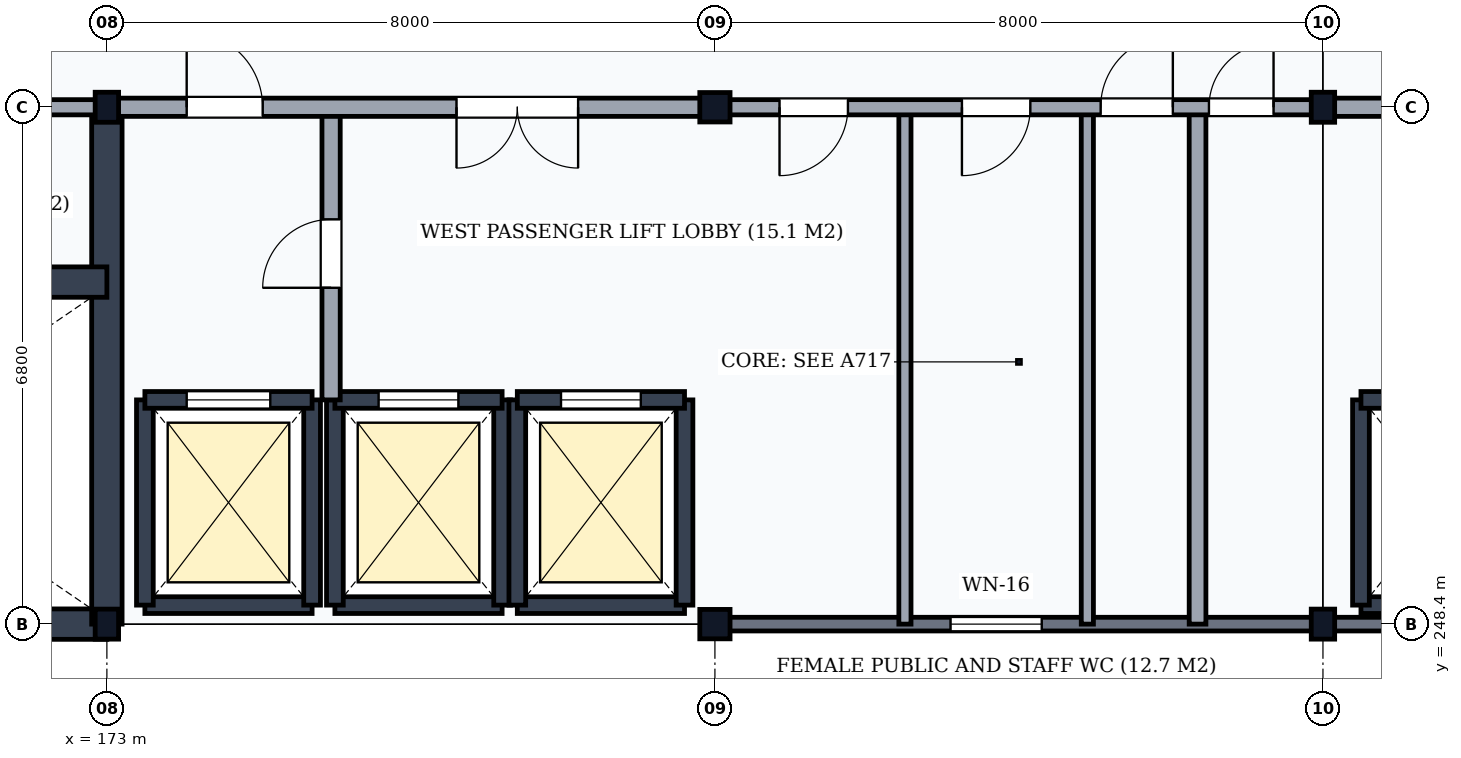
"""IFC4 building model, lengths in metres.
Left out: names, types, materials, properties, quantities, classifications, styles, units other than length and angle.
Written with IfcOpenShell. Run it as: python <this file> out.ifc"""

import sys

from ifc_helpers import new_model, si_unit, direction, frame, frame_2d, origin, origin_2d, place, context, subcontext, project, spatial, rectangle, i_section, extrude, element, fill, save


model = new_model("IFC4")
c1 = context("Model", 3, precision=1e-05, world=origin(), true_north=direction((0.0, 1.0)))
c2 = subcontext(c1, "Body", "Model", "MODEL_VIEW")
j1 = project(units=[si_unit("LENGTHUNIT", "METRE"), si_unit("PLANEANGLEUNIT", "RADIAN")], contexts=[c1])
p1 = place(None, origin())
s1 = spatial("IfcSite", under=j1, at=p1, CompositionType="ELEMENT")
p2 = place(p1, origin())
s2 = spatial("IfcBuilding", under=s1, at=p2, CompositionType="ELEMENT")
p3 = place(p2, frame((0.0, 0.0, 28.2)))
s3 = spatial("IfcBuildingStorey", under=s2, at=p3, CompositionType="ELEMENT", Elevation=28.2)
for number, where, z_axis, x_axis in (
    (1, (173.0, 248.4, 0.0), (0.0, 0.0, 1.0), (1.0, 0.0, 0.0)),
    (2, (173.0, 255.2, 0.0), (0.0, 0.0, 1.0), (1.0, 0.0, 0.0)),
):
    element("IfcColumn", number, at=place(p3, frame(where, z_axis=z_axis, x_axis=x_axis)), inside=s3, PredefinedType="COLUMN", context=c2, shape_type="SweptSolid", body=[
        extrude(i_section(OverallWidth=0.308, OverallDepth=0.395, WebThickness=0.021, FlangeThickness=0.04, FilletRadius=0.027, at=origin_2d()), origin(), (0.0, 0.0, 1.0), 3.9),
    ])
for number, where, z_axis, x_axis in (
    (3, (181.0, 248.4, 0.0), (0.0, 0.0, 1.0), (1.0, 0.0, 0.0)),
    (4, (181.0, 255.2, 0.0), (0.0, 0.0, 1.0), (1.0, 0.0, 0.0)),
):
    element("IfcColumn", number, at=place(p3, frame(where, z_axis=z_axis, x_axis=x_axis)), inside=s3, PredefinedType="COLUMN", context=c2, shape_type="SweptSolid", body=[
        extrude(i_section(OverallWidth=0.398, OverallDepth=0.387, WebThickness=0.021, FlangeThickness=0.033, FilletRadius=0.015, at=origin_2d()), origin(), (0.0, 0.0, 1.0), 3.9),
    ])
for number, where, z_axis, x_axis in (
    (5, (189.0, 248.4, 0.0), (0.0, 0.0, 1.0), (1.0, 0.0, 0.0)),
    (6, (189.0, 255.2, 0.0), (0.0, 0.0, 1.0), (1.0, 0.0, 0.0)),
):
    element("IfcColumn", number, at=place(p3, frame(where, z_axis=z_axis, x_axis=x_axis)), inside=s3, PredefinedType="COLUMN", context=c2, shape_type="SweptSolid", body=[
        extrude(i_section(OverallWidth=0.308, OverallDepth=0.395, WebThickness=0.021, FlangeThickness=0.04, FilletRadius=0.027, at=origin_2d()), origin(), (0.0, 0.0, 1.0), 3.9),
    ])
p4 = place(p3, frame((181.006, 248.4, 0.0), z_axis=(0.0, 0.0, 1.0), x_axis=(1.0, 0.0, 0.0)))
e7 = element("IfcWall", 7, at=p4, inside=s3, PredefinedType="SOLIDWALL", context=c2, shape_type="SweptSolid", body=[
    extrude(rectangle(XDim=7.988, YDim=0.18, at=frame_2d((3.994, 0.0))), origin(), (0.0, 0.0, 1.0), 3.348),
])
p5 = place(p4, frame((3.094, 0.0, 0.95)))
e8 = element("IfcOpeningElement", 8, at=p5, cuts=e7, PredefinedType="OPENING", context=c2, shape_type="SweptSolid", body=[
    extrude(rectangle(XDim=1.2, YDim=1.8, at=frame_2d((0.6, 0.9))), frame((0.0, 0.105, 0.0), z_axis=(0.0, -1.0, 0.0), x_axis=(1.0, 0.0, 0.0)), (0.0, 0.0, 1.0), 0.21),
])
p6 = place(p3, frame((189.006, 248.4, 0.0), z_axis=(0.0, 0.0, 1.0), x_axis=(1.0, 0.0, 0.0)))
e9 = element("IfcWall", 9, at=p6, inside=s3, PredefinedType="SOLIDWALL", context=c2, shape_type="SweptSolid", body=[
    extrude(rectangle(XDim=7.988, YDim=0.18, at=frame_2d((3.994, 0.0))), origin(), (0.0, 0.0, 1.0), 3.348),
])
p7 = place(p3, frame((165.0, 248.4, 0.0), z_axis=(0.0, 0.0, 1.0), x_axis=(1.0, 0.0, 0.0)))
e10 = element("IfcWall", 10, at=p7, inside=s3, PredefinedType="SHEAR", context=c2, shape_type="SweptSolid", body=[
    extrude(rectangle(XDim=8.0, YDim=0.4, at=frame_2d((4.0, 0.0))), origin(), (0.0, 0.0, 1.0), 3.66),
])
p8 = place(p3, frame((173.0, 248.4, 0.0), z_axis=(0.0, 0.0, 1.0), x_axis=(0.0, 1.0, 0.0)))
e11 = element("IfcWall", 11, at=p8, inside=s3, PredefinedType="SHEAR", context=c2, shape_type="SweptSolid", body=[
    extrude(rectangle(XDim=6.8, YDim=0.4, at=frame_2d((3.4, 0.0))), origin(), (0.0, 0.0, 1.0), 3.66),
])
p9 = place(p3, frame((165.0, 252.9, 0.0), z_axis=(0.0, 0.0, 1.0), x_axis=(1.0, 0.0, 0.0)))
e12 = element("IfcWall", 12, at=p9, inside=s3, PredefinedType="SHEAR", context=c2, shape_type="SweptSolid", body=[
    extrude(rectangle(XDim=8.0, YDim=0.4, at=frame_2d((4.0, 0.0))), origin(), (0.0, 0.0, 1.0), 3.66),
])
p10 = place(p9, frame((0.3, 0.0, 0.0)))
e13 = element("IfcOpeningElement", 13, at=p10, cuts=e12, PredefinedType="OPENING", context=c2, shape_type="SweptSolid", body=[
    extrude(rectangle(XDim=1.15, YDim=2.15, at=frame_2d((0.575, 1.075))), frame((0.0, 0.215, 0.0), z_axis=(0.0, -1.0, 0.0), x_axis=(1.0, 0.0, 0.0)), (0.0, 0.0, 1.0), 0.43),
])
p11 = place(p3, frame((165.0, 255.2, 0.0), z_axis=(0.0, 0.0, 1.0), x_axis=(1.0, 0.0, 0.0)))
e14 = element("IfcWall", 14, at=p11, inside=s3, PredefinedType="PARTITIONING", context=c2, shape_type="SweptSolid", body=[
    extrude(rectangle(XDim=8.0, YDim=0.2, at=frame_2d((4.0, 0.0))), origin(), (0.0, 0.0, 1.0), 3.058),
])
p12 = place(p11, frame((3.275, 0.0, 0.0)))
e15 = element("IfcOpeningElement", 15, at=p12, cuts=e14, PredefinedType="OPENING", context=c2, shape_type="SweptSolid", body=[
    extrude(rectangle(XDim=1.45, YDim=2.2, at=frame_2d((0.725, 1.1))), frame((0.0, 0.115, 0.0), z_axis=(0.0, -1.0, 0.0), x_axis=(1.0, 0.0, 0.0)), (0.0, 0.0, 1.0), 0.23),
])
p13 = place(p3, frame((173.5, 248.65, 0.0), z_axis=(0.0, 0.0, 1.0), x_axis=(1.0, 0.0, 0.0)))
e16 = element("IfcWall", 16, at=p13, inside=s3, PredefinedType="SHEAR", context=c2, shape_type="SweptSolid", body=[
    extrude(rectangle(XDim=2.2, YDim=0.22, at=frame_2d((1.1, 0.0))), origin(), (0.0, 0.0, 1.0), 3.66),
])
for number, where, z_axis, x_axis in (
    (17, (173.5, 248.65, 0.0), (0.0, 0.0, 1.0), (0.0, 1.0, 0.0)),
    (18, (175.7, 248.65, 0.0), (0.0, 0.0, 1.0), (0.0, 1.0, 0.0)),
):
    element("IfcWall", number, at=place(p3, frame(where, z_axis=z_axis, x_axis=x_axis)), inside=s3, PredefinedType="SHEAR", context=c2, shape_type="SweptSolid", body=[
        extrude(rectangle(XDim=2.7, YDim=0.22, at=frame_2d((1.35, 0.0))), origin(), (0.0, 0.0, 1.0), 3.66),
    ])
p14 = place(p3, frame((173.5, 251.35, 0.0), z_axis=(0.0, 0.0, 1.0), x_axis=(1.0, 0.0, 0.0)))
e19 = element("IfcWall", 19, at=p14, inside=s3, PredefinedType="SHEAR", context=c2, shape_type="SweptSolid", body=[
    extrude(rectangle(XDim=2.2, YDim=0.22, at=frame_2d((1.1, 0.0))), origin(), (0.0, 0.0, 1.0), 3.66),
])
p15 = place(p14, frame((0.55, 0.0, 0.0)))
e20 = element("IfcOpeningElement", 20, at=p15, cuts=e19, PredefinedType="OPENING", context=c2, shape_type="SweptSolid", body=[
    extrude(rectangle(XDim=1.1, YDim=2.15, at=frame_2d((0.55, 1.075))), frame((0.0, 0.125, 0.0), z_axis=(0.0, -1.0, 0.0), x_axis=(1.0, 0.0, 0.0)), (0.0, 0.0, 1.0), 0.25),
])
p16 = place(p3, frame((176.0, 248.65, 0.0), z_axis=(0.0, 0.0, 1.0), x_axis=(1.0, 0.0, 0.0)))
e21 = element("IfcWall", 21, at=p16, inside=s3, PredefinedType="SHEAR", context=c2, shape_type="SweptSolid", body=[
    extrude(rectangle(XDim=2.2, YDim=0.22, at=frame_2d((1.1, 0.0))), origin(), (0.0, 0.0, 1.0), 3.66),
])
for number, where, z_axis, x_axis in (
    (22, (176.0, 248.65, 0.0), (0.0, 0.0, 1.0), (0.0, 1.0, 0.0)),
    (23, (178.2, 248.65, 0.0), (0.0, 0.0, 1.0), (0.0, 1.0, 0.0)),
):
    element("IfcWall", number, at=place(p3, frame(where, z_axis=z_axis, x_axis=x_axis)), inside=s3, PredefinedType="SHEAR", context=c2, shape_type="SweptSolid", body=[
        extrude(rectangle(XDim=2.7, YDim=0.22, at=frame_2d((1.35, 0.0))), origin(), (0.0, 0.0, 1.0), 3.66),
    ])
p17 = place(p3, frame((176.0, 251.35, 0.0), z_axis=(0.0, 0.0, 1.0), x_axis=(1.0, 0.0, 0.0)))
e24 = element("IfcWall", 24, at=p17, inside=s3, PredefinedType="SHEAR", context=c2, shape_type="SweptSolid", body=[
    extrude(rectangle(XDim=2.2, YDim=0.22, at=frame_2d((1.1, 0.0))), origin(), (0.0, 0.0, 1.0), 3.66),
])
p18 = place(p17, frame((0.575, 0.0, 0.0)))
e25 = element("IfcOpeningElement", 25, at=p18, cuts=e24, PredefinedType="OPENING", context=c2, shape_type="SweptSolid", body=[
    extrude(rectangle(XDim=1.05, YDim=2.15, at=frame_2d((0.525, 1.075))), frame((0.0, 0.125, 0.0), z_axis=(0.0, -1.0, 0.0), x_axis=(1.0, 0.0, 0.0)), (0.0, 0.0, 1.0), 0.25),
])
p19 = place(p3, frame((178.4, 248.65, 0.0), z_axis=(0.0, 0.0, 1.0), x_axis=(1.0, 0.0, 0.0)))
e26 = element("IfcWall", 26, at=p19, inside=s3, PredefinedType="SHEAR", context=c2, shape_type="SweptSolid", body=[
    extrude(rectangle(XDim=2.2, YDim=0.22, at=frame_2d((1.1, 0.0))), origin(), (0.0, 0.0, 1.0), 3.66),
])
for number, where, z_axis, x_axis in (
    (27, (178.4, 248.65, 0.0), (0.0, 0.0, 1.0), (0.0, 1.0, 0.0)),
    (28, (180.6, 248.65, 0.0), (0.0, 0.0, 1.0), (0.0, 1.0, 0.0)),
):
    element("IfcWall", number, at=place(p3, frame(where, z_axis=z_axis, x_axis=x_axis)), inside=s3, PredefinedType="SHEAR", context=c2, shape_type="SweptSolid", body=[
        extrude(rectangle(XDim=2.7, YDim=0.22, at=frame_2d((1.35, 0.0))), origin(), (0.0, 0.0, 1.0), 3.66),
    ])
p20 = place(p3, frame((178.4, 251.35, 0.0), z_axis=(0.0, 0.0, 1.0), x_axis=(1.0, 0.0, 0.0)))
e29 = element("IfcWall", 29, at=p20, inside=s3, PredefinedType="SHEAR", context=c2, shape_type="SweptSolid", body=[
    extrude(rectangle(XDim=2.2, YDim=0.22, at=frame_2d((1.1, 0.0))), origin(), (0.0, 0.0, 1.0), 3.66),
])
p21 = place(p20, frame((0.575, 0.0, 0.0)))
e30 = element("IfcOpeningElement", 30, at=p21, cuts=e29, PredefinedType="OPENING", context=c2, shape_type="SweptSolid", body=[
    extrude(rectangle(XDim=1.05, YDim=2.15, at=frame_2d((0.525, 1.075))), frame((0.0, 0.125, 0.0), z_axis=(0.0, -1.0, 0.0), x_axis=(1.0, 0.0, 0.0)), (0.0, 0.0, 1.0), 0.25),
])
p22 = place(p3, frame((189.5, 248.65, 0.0), z_axis=(0.0, 0.0, 1.0), x_axis=(1.0, 0.0, 0.0)))
e31 = element("IfcWall", 31, at=p22, inside=s3, PredefinedType="SHEAR", context=c2, shape_type="SweptSolid", body=[
    extrude(rectangle(XDim=2.2, YDim=0.22, at=frame_2d((1.1, 0.0))), origin(), (0.0, 0.0, 1.0), 3.66),
])
p23 = place(p3, frame((189.5, 248.65, 0.0), z_axis=(0.0, 0.0, 1.0), x_axis=(0.0, 1.0, 0.0)))
e32 = element("IfcWall", 32, at=p23, inside=s3, PredefinedType="SHEAR", context=c2, shape_type="SweptSolid", body=[
    extrude(rectangle(XDim=2.7, YDim=0.22, at=frame_2d((1.35, 0.0))), origin(), (0.0, 0.0, 1.0), 3.66),
])
p24 = place(p3, frame((189.5, 251.35, 0.0), z_axis=(0.0, 0.0, 1.0), x_axis=(1.0, 0.0, 0.0)))
e33 = element("IfcWall", 33, at=p24, inside=s3, PredefinedType="SHEAR", context=c2, shape_type="SweptSolid", body=[
    extrude(rectangle(XDim=2.2, YDim=0.22, at=frame_2d((1.1, 0.0))), origin(), (0.0, 0.0, 1.0), 3.66),
])
p25 = place(p24, frame((0.55, 0.0, 0.0)))
e34 = element("IfcOpeningElement", 34, at=p25, cuts=e33, PredefinedType="OPENING", context=c2, shape_type="SweptSolid", body=[
    extrude(rectangle(XDim=1.1, YDim=2.15, at=frame_2d((0.55, 1.075))), frame((0.0, 0.125, 0.0), z_axis=(0.0, -1.0, 0.0), x_axis=(1.0, 0.0, 0.0)), (0.0, 0.0, 1.0), 0.25),
])
p26 = place(p3, frame((175.95, 251.35, 0.0), z_axis=(0.0, 0.0, 1.0), x_axis=(0.0, 1.0, 0.0)))
e35 = element("IfcWall", 35, at=p26, inside=s3, PredefinedType="PARTITIONING", context=c2, shape_type="SweptSolid", body=[
    extrude(rectangle(XDim=3.85, YDim=0.24, at=frame_2d((1.925, 0.0))), origin(), (0.0, 0.0, 1.0), 3.66),
])
p27 = place(p26, frame((1.475, 0.0, 0.0)))
e36 = element("IfcOpeningElement", 36, at=p27, cuts=e35, PredefinedType="OPENING", context=c2, shape_type="SweptSolid", body=[
    extrude(rectangle(XDim=0.9, YDim=2.1, at=frame_2d((0.45, 1.05))), frame((0.0, 0.135, 0.0), z_axis=(0.0, -1.0, 0.0), x_axis=(1.0, 0.0, 0.0)), (0.0, 0.0, 1.0), 0.27),
])
for number, where, z_axis, x_axis in (
    (37, (183.5, 248.4, 0.0), (0.0, 0.0, 1.0), (0.0, 1.0, 0.0)),
    (38, (185.9, 248.4, 0.0), (0.0, 0.0, 1.0), (0.0, 1.0, 0.0)),
):
    element("IfcWall", number, at=place(p3, frame(where, z_axis=z_axis, x_axis=x_axis)), inside=s3, PredefinedType="PARTITIONING", context=c2, shape_type="SweptSolid", body=[
        extrude(rectangle(XDim=6.8, YDim=0.16, at=frame_2d((3.4, 0.0))), origin(), (0.0, 0.0, 1.0), 3.66),
    ])
p28 = place(p3, frame((187.35, 248.4, 0.0), z_axis=(0.0, 0.0, 1.0), x_axis=(0.0, 1.0, 0.0)))
e39 = element("IfcWall", 39, at=p28, inside=s3, PredefinedType="PARTITIONING", context=c2, shape_type="SweptSolid", body=[
    extrude(rectangle(XDim=6.8, YDim=0.22, at=frame_2d((3.4, 0.0))), origin(), (0.0, 0.0, 1.0), 3.66),
])
p29 = place(p3, frame((173.0, 255.2, 0.0), z_axis=(0.0, 0.0, 1.0), x_axis=(1.0, 0.0, 0.0)))
e40 = element("IfcWall", 40, at=p29, inside=s3, PredefinedType="PARTITIONING", context=c2, shape_type="SweptSolid", body=[
    extrude(rectangle(XDim=8.0, YDim=0.24, at=frame_2d((4.0, 0.0))), origin(), (0.0, 0.0, 1.0), 3.058),
])
p30 = place(p29, frame((1.05, 0.0, 0.0)))
e41 = element("IfcOpeningElement", 41, at=p30, cuts=e40, PredefinedType="OPENING", context=c2, shape_type="SweptSolid", body=[
    extrude(rectangle(XDim=1.0, YDim=2.1, at=frame_2d((0.5, 1.05))), frame((0.0, 0.135, 0.0), z_axis=(0.0, -1.0, 0.0), x_axis=(1.0, 0.0, 0.0)), (0.0, 0.0, 1.0), 0.27),
])
p31 = place(p29, frame((4.6, 0.0, 0.0)))
e42 = element("IfcOpeningElement", 42, at=p31, cuts=e40, PredefinedType="OPENING", context=c2, shape_type="SweptSolid", body=[
    extrude(rectangle(XDim=1.6, YDim=2.25, at=frame_2d((0.8, 1.125))), frame((0.0, 0.135, 0.0), z_axis=(0.0, -1.0, 0.0), x_axis=(1.0, 0.0, 0.0)), (0.0, 0.0, 1.0), 0.27),
])
p32 = place(p3, frame((181.0, 255.2, 0.0), z_axis=(0.0, 0.0, 1.0), x_axis=(1.0, 0.0, 0.0)))
e43 = element("IfcWall", 43, at=p32, inside=s3, PredefinedType="PARTITIONING", context=c2, shape_type="SweptSolid", body=[
    extrude(rectangle(XDim=8.0, YDim=0.2, at=frame_2d((4.0, 0.0))), origin(), (0.0, 0.0, 1.0), 3.058),
])
p33 = place(p32, frame((0.85, 0.0, 0.0)))
e44 = element("IfcOpeningElement", 44, at=p33, cuts=e43, PredefinedType="OPENING", context=c2, shape_type="SweptSolid", body=[
    extrude(rectangle(XDim=0.9, YDim=2.1, at=frame_2d((0.45, 1.05))), frame((0.0, 0.115, 0.0), z_axis=(0.0, -1.0, 0.0), x_axis=(1.0, 0.0, 0.0)), (0.0, 0.0, 1.0), 0.23),
])
p34 = place(p32, frame((3.25, 0.0, 0.0)))
e45 = element("IfcOpeningElement", 45, at=p34, cuts=e43, PredefinedType="OPENING", context=c2, shape_type="SweptSolid", body=[
    extrude(rectangle(XDim=0.9, YDim=2.1, at=frame_2d((0.45, 1.05))), frame((0.0, 0.115, 0.0), z_axis=(0.0, -1.0, 0.0), x_axis=(1.0, 0.0, 0.0)), (0.0, 0.0, 1.0), 0.23),
])
p35 = place(p32, frame((5.075, 0.0, 0.0)))
e46 = element("IfcOpeningElement", 46, at=p35, cuts=e43, PredefinedType="OPENING", context=c2, shape_type="SweptSolid", body=[
    extrude(rectangle(XDim=0.95, YDim=2.1, at=frame_2d((0.475, 1.05))), frame((0.0, 0.115, 0.0), z_axis=(0.0, -1.0, 0.0), x_axis=(1.0, 0.0, 0.0)), (0.0, 0.0, 1.0), 0.23),
])
p36 = place(p32, frame((6.5, 0.0, 0.0)))
e47 = element("IfcOpeningElement", 47, at=p36, cuts=e43, PredefinedType="OPENING", context=c2, shape_type="SweptSolid", body=[
    extrude(rectangle(XDim=0.85, YDim=2.1, at=frame_2d((0.425, 1.05))), frame((0.0, 0.115, 0.0), z_axis=(0.0, -1.0, 0.0), x_axis=(1.0, 0.0, 0.0)), (0.0, 0.0, 1.0), 0.23),
])
p37 = place(p3, frame((189.0, 255.2, 0.0), z_axis=(0.0, 0.0, 1.0), x_axis=(1.0, 0.0, 0.0)))
e48 = element("IfcWall", 48, at=p37, inside=s3, PredefinedType="PARTITIONING", context=c2, shape_type="SweptSolid", body=[
    extrude(rectangle(XDim=8.0, YDim=0.24, at=frame_2d((4.0, 0.0))), origin(), (0.0, 0.0, 1.0), 3.058),
])
p38 = place(p37, frame((1.05, 0.0, 0.0)))
e49 = element("IfcOpeningElement", 49, at=p38, cuts=e48, PredefinedType="OPENING", context=c2, shape_type="SweptSolid", body=[
    extrude(rectangle(XDim=1.0, YDim=2.1, at=frame_2d((0.5, 1.05))), frame((0.0, 0.135, 0.0), z_axis=(0.0, -1.0, 0.0), x_axis=(1.0, 0.0, 0.0)), (0.0, 0.0, 1.0), 0.27),
])
p39 = place(p37, frame((3.6, 0.0, 0.0)))
e50 = element("IfcOpeningElement", 50, at=p39, cuts=e48, PredefinedType="OPENING", context=c2, shape_type="SweptSolid", body=[
    extrude(rectangle(XDim=1.5, YDim=2.25, at=frame_2d((0.75, 1.125))), frame((0.0, 0.135, 0.0), z_axis=(0.0, -1.0, 0.0), x_axis=(1.0, 0.0, 0.0)), (0.0, 0.0, 1.0), 0.27),
])
p40 = place(p37, frame((6.425, 0.0, 0.0)))
e51 = element("IfcOpeningElement", 51, at=p40, cuts=e48, PredefinedType="OPENING", context=c2, shape_type="SweptSolid", body=[
    extrude(rectangle(XDim=0.85, YDim=2.1, at=frame_2d((0.425, 1.05))), frame((0.0, 0.135, 0.0), z_axis=(0.0, -1.0, 0.0), x_axis=(1.0, 0.0, 0.0)), (0.0, 0.0, 1.0), 0.27),
])
p41 = place(p5, origin())
e52 = element("IfcWindow", 52, at=p41, inside=s3, PartitioningType="SINGLE_PANEL", PredefinedType="WINDOW", context=c2, shape_type="SweptSolid", body=[
    extrude(rectangle(XDim=1.2, YDim=1.8, at=frame_2d((0.6, 0.9))), frame((0.0, 0.03, 0.0), z_axis=(0.0, -1.0, 0.0), x_axis=(1.0, 0.0, 0.0)), (0.0, 0.0, 1.0), 0.06),
])
fill(e8, e52)
p42 = place(p15, origin())
e53 = element("IfcDoor", 53, at=p42, inside=s3, OperationType="DOUBLE_DOOR_SLIDING", PredefinedType="USERDEFINED", context=c2, shape_type="SweptSolid", body=[
    extrude(rectangle(XDim=1.1, YDim=2.15, at=frame_2d((0.55, 1.075))), frame((0.0, 0.025, 0.0), z_axis=(0.0, -1.0, 0.0), x_axis=(1.0, 0.0, 0.0)), (0.0, 0.0, 1.0), 0.05),
])
fill(e20, e53)
p43 = place(p18, origin())
e54 = element("IfcDoor", 54, at=p43, inside=s3, OperationType="DOUBLE_DOOR_SLIDING", PredefinedType="USERDEFINED", context=c2, shape_type="SweptSolid", body=[
    extrude(rectangle(XDim=1.05, YDim=2.15, at=frame_2d((0.525, 1.075))), frame((0.0, 0.025, 0.0), z_axis=(0.0, -1.0, 0.0), x_axis=(1.0, 0.0, 0.0)), (0.0, 0.0, 1.0), 0.05),
])
fill(e25, e54)
p44 = place(p21, origin())
e55 = element("IfcDoor", 55, at=p44, inside=s3, OperationType="DOUBLE_DOOR_SLIDING", PredefinedType="USERDEFINED", context=c2, shape_type="SweptSolid", body=[
    extrude(rectangle(XDim=1.05, YDim=2.15, at=frame_2d((0.525, 1.075))), frame((0.0, 0.025, 0.0), z_axis=(0.0, -1.0, 0.0), x_axis=(1.0, 0.0, 0.0)), (0.0, 0.0, 1.0), 0.05),
])
fill(e30, e55)
p45 = place(p27, origin())
e56 = element("IfcDoor", 56, at=p45, inside=s3, OperationType="SINGLE_SWING_LEFT", PredefinedType="DOOR", context=c2, shape_type="SweptSolid", body=[
    extrude(rectangle(XDim=0.9, YDim=2.1, at=frame_2d((0.45, 1.05))), frame((0.0, 0.025, 0.0), z_axis=(0.0, -1.0, 0.0), x_axis=(1.0, 0.0, 0.0)), (0.0, 0.0, 1.0), 0.05),
])
fill(e36, e56)
p46 = place(p30, origin())
e57 = element("IfcDoor", 57, at=p46, inside=s3, OperationType="SINGLE_SWING_LEFT", PredefinedType="DOOR", context=c2, shape_type="SweptSolid", body=[
    extrude(rectangle(XDim=1.0, YDim=2.1, at=frame_2d((0.5, 1.05))), frame((0.0, 0.025, 0.0), z_axis=(0.0, -1.0, 0.0), x_axis=(1.0, 0.0, 0.0)), (0.0, 0.0, 1.0), 0.05),
])
fill(e41, e57)
p47 = place(p31, frame((1.6, 0.0, 0.0), z_axis=(0.0, 0.0, 1.0), x_axis=(-1.0, 0.0, 0.0)))
e58 = element("IfcDoor", 58, at=p47, inside=s3, OperationType="DOUBLE_DOOR_SINGLE_SWING", PredefinedType="DOOR", context=c2, shape_type="SweptSolid", body=[
    extrude(rectangle(XDim=1.6, YDim=2.25, at=frame_2d((0.8, 1.125))), frame((0.0, 0.025, 0.0), z_axis=(0.0, -1.0, 0.0), x_axis=(1.0, 0.0, 0.0)), (0.0, 0.0, 1.0), 0.05),
])
fill(e42, e58)
p48 = place(p33, frame((0.9, 0.0, 0.0), z_axis=(0.0, 0.0, 1.0), x_axis=(-1.0, 0.0, 0.0)))
e59 = element("IfcDoor", 59, at=p48, inside=s3, OperationType="SINGLE_SWING_RIGHT", PredefinedType="DOOR", context=c2, shape_type="SweptSolid", body=[
    extrude(rectangle(XDim=0.9, YDim=2.1, at=frame_2d((0.45, 1.05))), frame((0.0, 0.025, 0.0), z_axis=(0.0, -1.0, 0.0), x_axis=(1.0, 0.0, 0.0)), (0.0, 0.0, 1.0), 0.05),
])
fill(e44, e59)
p49 = place(p34, frame((0.9, 0.0, 0.0), z_axis=(0.0, 0.0, 1.0), x_axis=(-1.0, 0.0, 0.0)))
e60 = element("IfcDoor", 60, at=p49, inside=s3, OperationType="SINGLE_SWING_RIGHT", PredefinedType="DOOR", context=c2, shape_type="SweptSolid", body=[
    extrude(rectangle(XDim=0.9, YDim=2.1, at=frame_2d((0.45, 1.05))), frame((0.0, 0.025, 0.0), z_axis=(0.0, -1.0, 0.0), x_axis=(1.0, 0.0, 0.0)), (0.0, 0.0, 1.0), 0.05),
])
fill(e45, e60)
p50 = place(p35, frame((0.95, 0.0, 0.0), z_axis=(0.0, 0.0, 1.0), x_axis=(-1.0, 0.0, 0.0)))
e61 = element("IfcDoor", 61, at=p50, inside=s3, OperationType="SINGLE_SWING_LEFT", PredefinedType="DOOR", context=c2, shape_type="SweptSolid", body=[
    extrude(rectangle(XDim=0.95, YDim=2.1, at=frame_2d((0.475, 1.05))), frame((0.0, 0.025, 0.0), z_axis=(0.0, -1.0, 0.0), x_axis=(1.0, 0.0, 0.0)), (0.0, 0.0, 1.0), 0.05),
])
fill(e46, e61)
p51 = place(p36, frame((0.85, 0.0, 0.0), z_axis=(0.0, 0.0, 1.0), x_axis=(-1.0, 0.0, 0.0)))
e62 = element("IfcDoor", 62, at=p51, inside=s3, OperationType="SINGLE_SWING_LEFT", PredefinedType="DOOR", context=c2, shape_type="SweptSolid", body=[
    extrude(rectangle(XDim=0.85, YDim=2.1, at=frame_2d((0.425, 1.05))), frame((0.0, 0.025, 0.0), z_axis=(0.0, -1.0, 0.0), x_axis=(1.0, 0.0, 0.0)), (0.0, 0.0, 1.0), 0.05),
])
fill(e47, e62)
save(model, sys.argv[1])
